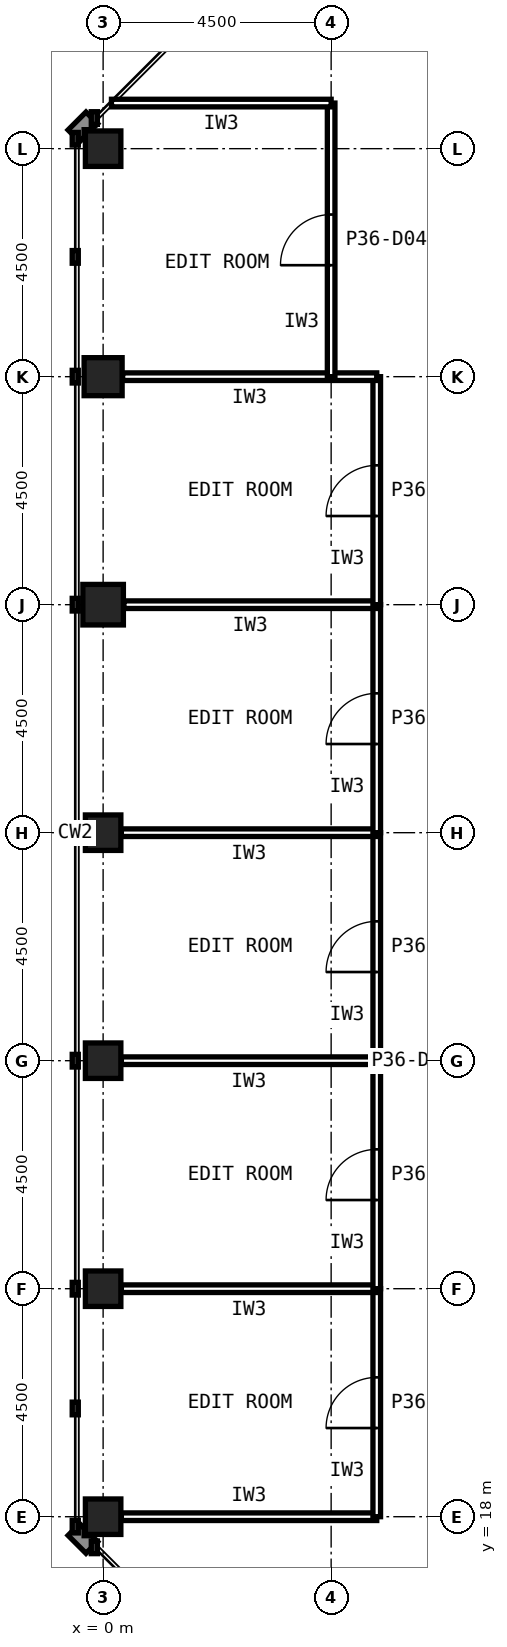
"""IFC4 building model, lengths in metres.
Left out: names, types, materials, properties, quantities, classifications, styles, units other than length and angle.
Written with IfcOpenShell. Run it as: python <this file> out.ifc"""

import sys

from ifc_helpers import new_model, si_unit, direction, frame, frame_2d, origin, origin_2d, place, context, subcontext, project, spatial, rectangle, hollow_rectangle, extrude, element, fill, save


model = new_model("IFC4")
c1 = context("Model", 3, precision=1e-05, world=origin(), true_north=direction((0.0, 1.0)))
c2 = subcontext(c1, "Body", "Model", "MODEL_VIEW")
j1 = project(units=[si_unit("LENGTHUNIT", "METRE"), si_unit("PLANEANGLEUNIT", "RADIAN")], contexts=[c1])
p1 = place(None, origin())
s1 = spatial("IfcSite", under=j1, at=p1, CompositionType="ELEMENT")
p2 = place(p1, origin())
s2 = spatial("IfcBuilding", under=s1, at=p2, CompositionType="ELEMENT")
p3 = place(p2, frame((0.0, 0.0, 151.6)))
s3 = spatial("IfcBuildingStorey", under=s2, at=p3, CompositionType="ELEMENT", Elevation=151.6)
p4 = place(p3, frame((0.0, 45.0, 0.0), z_axis=(0.0, 0.0, 1.0), x_axis=(1.0, 0.0, 0.0)))
e1 = element("IfcColumn", 1, at=p4, inside=s3, PredefinedType="COLUMN", context=c2, shape_type="SweptSolid", body=[
    extrude(hollow_rectangle(XDim=0.75, YDim=0.75, WallThickness=0.04, at=origin_2d()), origin(), (0.0, 0.0, 1.0), 4.0),
])
p5 = place(p3, frame((0.0, 40.5, 0.0), z_axis=(0.0, 0.0, 1.0), x_axis=(1.0, 0.0, 0.0)))
e2 = element("IfcColumn", 2, at=p5, inside=s3, PredefinedType="COLUMN", context=c2, shape_type="SweptSolid", body=[
    extrude(hollow_rectangle(XDim=0.8, YDim=0.8, WallThickness=0.045, at=origin_2d()), origin(), (0.0, 0.0, 1.0), 4.0),
])
p6 = place(p3, frame((0.0, 36.0, 0.0), z_axis=(0.0, 0.0, 1.0), x_axis=(1.0, 0.0, 0.0)))
e3 = element("IfcColumn", 3, at=p6, inside=s3, PredefinedType="COLUMN", context=c2, shape_type="SweptSolid", body=[
    extrude(hollow_rectangle(XDim=0.85, YDim=0.85, WallThickness=0.05, at=origin_2d()), origin(), (0.0, 0.0, 1.0), 4.0),
])
for number, where, z_axis, x_axis in (
    (4, (0.0, 31.5, 0.0), (0.0, 0.0, 1.0), (1.0, 0.0, 0.0)),
    (5, (0.0, 27.0, 0.0), (0.0, 0.0, 1.0), (1.0, 0.0, 0.0)),
    (6, (0.0, 22.5, 0.0), (0.0, 0.0, 1.0), (1.0, 0.0, 0.0)),
    (7, (0.0, 18.0, 0.0), (0.0, 0.0, 1.0), (1.0, 0.0, 0.0)),
):
    element("IfcColumn", number, at=place(p3, frame(where, z_axis=z_axis, x_axis=x_axis)), inside=s3, PredefinedType="COLUMN", context=c2, shape_type="SweptSolid", body=[
        extrude(hollow_rectangle(XDim=0.75, YDim=0.75, WallThickness=0.04, at=origin_2d()), origin(), (0.0, 0.0, 1.0), 4.0),
    ])
p7 = place(p3, frame((0.385, 18.0, 0.0), z_axis=(0.0, 0.0, 1.0), x_axis=(1.0, 0.0, 0.0)))
e8 = element("IfcWall", 8, at=p7, inside=s3, PredefinedType="PARTITIONING", context=c2, shape_type="SweptSolid", body=[
    extrude(rectangle(XDim=5.015, YDim=0.15, at=frame_2d((2.507, 0.0))), origin(), (0.0, 0.0, 1.0), 2.989),
])
p8 = place(p3, frame((5.4, 18.0, 0.0), z_axis=(0.0, 0.0, 1.0), x_axis=(0.0, 1.0, 0.0)))
e9 = element("IfcWall", 9, at=p8, inside=s3, PredefinedType="PARTITIONING", context=c2, shape_type="SweptSolid", body=[
    extrude(rectangle(XDim=4.5, YDim=0.15, at=frame_2d((2.25, 0.0))), origin(), (0.0, 0.0, 1.0), 3.84),
])
p9 = place(p8, frame((1.75, 0.0, 0.0)))
e10 = element("IfcOpeningElement", 10, at=p9, cuts=e9, PredefinedType="OPENING", context=c2, shape_type="SweptSolid", body=[
    extrude(rectangle(XDim=1.0, YDim=2.1, at=frame_2d((0.5, 1.05))), frame((0.0, 0.085, 0.0), z_axis=(0.0, -1.0, 0.0), x_axis=(1.0, 0.0, 0.0)), (0.0, 0.0, 1.0), 0.17),
])
p10 = place(p3, frame((5.4, 22.5, 0.0), z_axis=(0.0, 0.0, 1.0), x_axis=(-1.0, 0.0, 0.0)))
e11 = element("IfcWall", 11, at=p10, inside=s3, PredefinedType="PARTITIONING", context=c2, shape_type="SweptSolid", body=[
    extrude(rectangle(XDim=5.015, YDim=0.15, at=frame_2d((2.507, 0.0))), origin(), (0.0, 0.0, 1.0), 2.989),
])
p11 = place(p3, frame((5.4, 22.5, 0.0), z_axis=(0.0, 0.0, 1.0), x_axis=(0.0, 1.0, 0.0)))
e12 = element("IfcWall", 12, at=p11, inside=s3, PredefinedType="PARTITIONING", context=c2, shape_type="SweptSolid", body=[
    extrude(rectangle(XDim=4.5, YDim=0.15, at=frame_2d((2.25, 0.0))), origin(), (0.0, 0.0, 1.0), 3.84),
])
p12 = place(p11, frame((1.75, 0.0, 0.0)))
e13 = element("IfcOpeningElement", 13, at=p12, cuts=e12, PredefinedType="OPENING", context=c2, shape_type="SweptSolid", body=[
    extrude(rectangle(XDim=1.0, YDim=2.1, at=frame_2d((0.5, 1.05))), frame((0.0, 0.085, 0.0), z_axis=(0.0, -1.0, 0.0), x_axis=(1.0, 0.0, 0.0)), (0.0, 0.0, 1.0), 0.17),
])
p13 = place(p3, frame((5.4, 27.0, 0.0), z_axis=(0.0, 0.0, 1.0), x_axis=(-1.0, 0.0, 0.0)))
e14 = element("IfcWall", 14, at=p13, inside=s3, PredefinedType="PARTITIONING", context=c2, shape_type="SweptSolid", body=[
    extrude(rectangle(XDim=5.015, YDim=0.15, at=frame_2d((2.507, 0.0))), origin(), (0.0, 0.0, 1.0), 2.989),
])
p14 = place(p3, frame((5.4, 27.0, 0.0), z_axis=(0.0, 0.0, 1.0), x_axis=(0.0, 1.0, 0.0)))
e15 = element("IfcWall", 15, at=p14, inside=s3, PredefinedType="PARTITIONING", context=c2, shape_type="SweptSolid", body=[
    extrude(rectangle(XDim=4.5, YDim=0.15, at=frame_2d((2.25, 0.0))), origin(), (0.0, 0.0, 1.0), 3.84),
])
p15 = place(p14, frame((1.75, 0.0, 0.0)))
e16 = element("IfcOpeningElement", 16, at=p15, cuts=e15, PredefinedType="OPENING", context=c2, shape_type="SweptSolid", body=[
    extrude(rectangle(XDim=1.0, YDim=2.1, at=frame_2d((0.5, 1.05))), frame((0.0, 0.085, 0.0), z_axis=(0.0, -1.0, 0.0), x_axis=(1.0, 0.0, 0.0)), (0.0, 0.0, 1.0), 0.17),
])
p16 = place(p3, frame((5.4, 31.5, 0.0), z_axis=(0.0, 0.0, 1.0), x_axis=(-1.0, 0.0, 0.0)))
e17 = element("IfcWall", 17, at=p16, inside=s3, PredefinedType="PARTITIONING", context=c2, shape_type="SweptSolid", body=[
    extrude(rectangle(XDim=5.015, YDim=0.15, at=frame_2d((2.507, 0.0))), origin(), (0.0, 0.0, 1.0), 2.989),
])
p17 = place(p3, frame((5.4, 31.5, 0.0), z_axis=(0.0, 0.0, 1.0), x_axis=(0.0, 1.0, 0.0)))
e18 = element("IfcWall", 18, at=p17, inside=s3, PredefinedType="PARTITIONING", context=c2, shape_type="SweptSolid", body=[
    extrude(rectangle(XDim=4.5, YDim=0.15, at=frame_2d((2.25, 0.0))), origin(), (0.0, 0.0, 1.0), 3.84),
])
p18 = place(p17, frame((1.75, 0.0, 0.0)))
e19 = element("IfcOpeningElement", 19, at=p18, cuts=e18, PredefinedType="OPENING", context=c2, shape_type="SweptSolid", body=[
    extrude(rectangle(XDim=1.0, YDim=2.1, at=frame_2d((0.5, 1.05))), frame((0.0, 0.085, 0.0), z_axis=(0.0, -1.0, 0.0), x_axis=(1.0, 0.0, 0.0)), (0.0, 0.0, 1.0), 0.17),
])
p19 = place(p3, frame((5.4, 36.0, 0.0), z_axis=(0.0, 0.0, 1.0), x_axis=(-1.0, 0.0, 0.0)))
e20 = element("IfcWall", 20, at=p19, inside=s3, PredefinedType="PARTITIONING", context=c2, shape_type="SweptSolid", body=[
    extrude(rectangle(XDim=4.965, YDim=0.15, at=frame_2d((2.482, 0.0))), origin(), (0.0, 0.0, 1.0), 2.989),
])
p20 = place(p3, frame((5.4, 36.0, 0.0), z_axis=(0.0, 0.0, 1.0), x_axis=(0.0, 1.0, 0.0)))
e21 = element("IfcWall", 21, at=p20, inside=s3, PredefinedType="PARTITIONING", context=c2, shape_type="SweptSolid", body=[
    extrude(rectangle(XDim=4.5, YDim=0.15, at=frame_2d((2.25, 0.0))), origin(), (0.0, 0.0, 1.0), 3.84),
])
p21 = place(p20, frame((1.75, 0.0, 0.0)))
e22 = element("IfcOpeningElement", 22, at=p21, cuts=e21, PredefinedType="OPENING", context=c2, shape_type="SweptSolid", body=[
    extrude(rectangle(XDim=1.0, YDim=2.1, at=frame_2d((0.5, 1.05))), frame((0.0, 0.085, 0.0), z_axis=(0.0, -1.0, 0.0), x_axis=(1.0, 0.0, 0.0)), (0.0, 0.0, 1.0), 0.17),
])
p22 = place(p3, frame((5.4, 40.5, 0.0), z_axis=(0.0, 0.0, 1.0), x_axis=(-1.0, 0.0, 0.0)))
e23 = element("IfcWall", 23, at=p22, inside=s3, PredefinedType="PARTITIONING", context=c2, shape_type="SweptSolid", body=[
    extrude(rectangle(XDim=4.99, YDim=0.15, at=frame_2d((2.495, 0.0))), origin(), (0.0, 0.0, 1.0), 2.989),
])
p23 = place(p3, frame((4.5, 40.5, 0.0), z_axis=(0.0, 0.0, 1.0), x_axis=(0.0, 1.0, 0.0)))
e24 = element("IfcWall", 24, at=p23, inside=s3, PredefinedType="PARTITIONING", context=c2, shape_type="SweptSolid", body=[
    extrude(rectangle(XDim=5.4, YDim=0.15, at=frame_2d((2.7, 0.0))), origin(), (0.0, 0.0, 1.0), 3.84),
])
p24 = place(p23, frame((2.2, 0.0, 0.0)))
e25 = element("IfcOpeningElement", 25, at=p24, cuts=e24, PredefinedType="OPENING", context=c2, shape_type="SweptSolid", body=[
    extrude(rectangle(XDim=1.0, YDim=2.1, at=frame_2d((0.5, 1.05))), frame((0.0, 0.085, 0.0), z_axis=(0.0, -1.0, 0.0), x_axis=(1.0, 0.0, 0.0)), (0.0, 0.0, 1.0), 0.17),
])
p25 = place(p3, frame((4.5, 45.9, 0.0), z_axis=(0.0, 0.0, 1.0), x_axis=(-1.0, 0.0, 0.0)))
e26 = element("IfcWall", 26, at=p25, inside=s3, PredefinedType="PARTITIONING", context=c2, shape_type="SweptSolid", body=[
    extrude(rectangle(XDim=4.335, YDim=0.15, at=frame_2d((2.168, 0.0))), origin(), (0.0, 0.0, 1.0), 3.84),
])
p26 = place(p9, origin())
e27 = element("IfcDoor", 27, at=p26, inside=s3, OperationType="SINGLE_SWING_LEFT", PredefinedType="DOOR", context=c2, shape_type="SweptSolid", body=[
    extrude(rectangle(XDim=1.0, YDim=2.1, at=frame_2d((0.5, 1.05))), frame((0.0, 0.025, 0.0), z_axis=(0.0, -1.0, 0.0), x_axis=(1.0, 0.0, 0.0)), (0.0, 0.0, 1.0), 0.05),
])
fill(e10, e27)
p27 = place(p12, origin())
e28 = element("IfcDoor", 28, at=p27, inside=s3, OperationType="SINGLE_SWING_LEFT", PredefinedType="DOOR", context=c2, shape_type="SweptSolid", body=[
    extrude(rectangle(XDim=1.0, YDim=2.1, at=frame_2d((0.5, 1.05))), frame((0.0, 0.025, 0.0), z_axis=(0.0, -1.0, 0.0), x_axis=(1.0, 0.0, 0.0)), (0.0, 0.0, 1.0), 0.05),
])
fill(e13, e28)
p28 = place(p15, origin())
e29 = element("IfcDoor", 29, at=p28, inside=s3, OperationType="SINGLE_SWING_LEFT", PredefinedType="DOOR", context=c2, shape_type="SweptSolid", body=[
    extrude(rectangle(XDim=1.0, YDim=2.1, at=frame_2d((0.5, 1.05))), frame((0.0, 0.025, 0.0), z_axis=(0.0, -1.0, 0.0), x_axis=(1.0, 0.0, 0.0)), (0.0, 0.0, 1.0), 0.05),
])
fill(e16, e29)
p29 = place(p18, origin())
e30 = element("IfcDoor", 30, at=p29, inside=s3, OperationType="SINGLE_SWING_LEFT", PredefinedType="DOOR", context=c2, shape_type="SweptSolid", body=[
    extrude(rectangle(XDim=1.0, YDim=2.1, at=frame_2d((0.5, 1.05))), frame((0.0, 0.025, 0.0), z_axis=(0.0, -1.0, 0.0), x_axis=(1.0, 0.0, 0.0)), (0.0, 0.0, 1.0), 0.05),
])
fill(e19, e30)
p30 = place(p21, origin())
e31 = element("IfcDoor", 31, at=p30, inside=s3, OperationType="SINGLE_SWING_LEFT", PredefinedType="DOOR", context=c2, shape_type="SweptSolid", body=[
    extrude(rectangle(XDim=1.0, YDim=2.1, at=frame_2d((0.5, 1.05))), frame((0.0, 0.025, 0.0), z_axis=(0.0, -1.0, 0.0), x_axis=(1.0, 0.0, 0.0)), (0.0, 0.0, 1.0), 0.05),
])
fill(e22, e31)
p31 = place(p24, origin())
e32 = element("IfcDoor", 32, at=p31, inside=s3, OperationType="SINGLE_SWING_LEFT", PredefinedType="DOOR", context=c2, shape_type="SweptSolid", body=[
    extrude(rectangle(XDim=1.0, YDim=2.1, at=frame_2d((0.5, 1.05))), frame((0.0, 0.025, 0.0), z_axis=(0.0, -1.0, 0.0), x_axis=(1.0, 0.0, 0.0)), (0.0, 0.0, 1.0), 0.05),
])
fill(e25, e32)
save(model, sys.argv[1])
